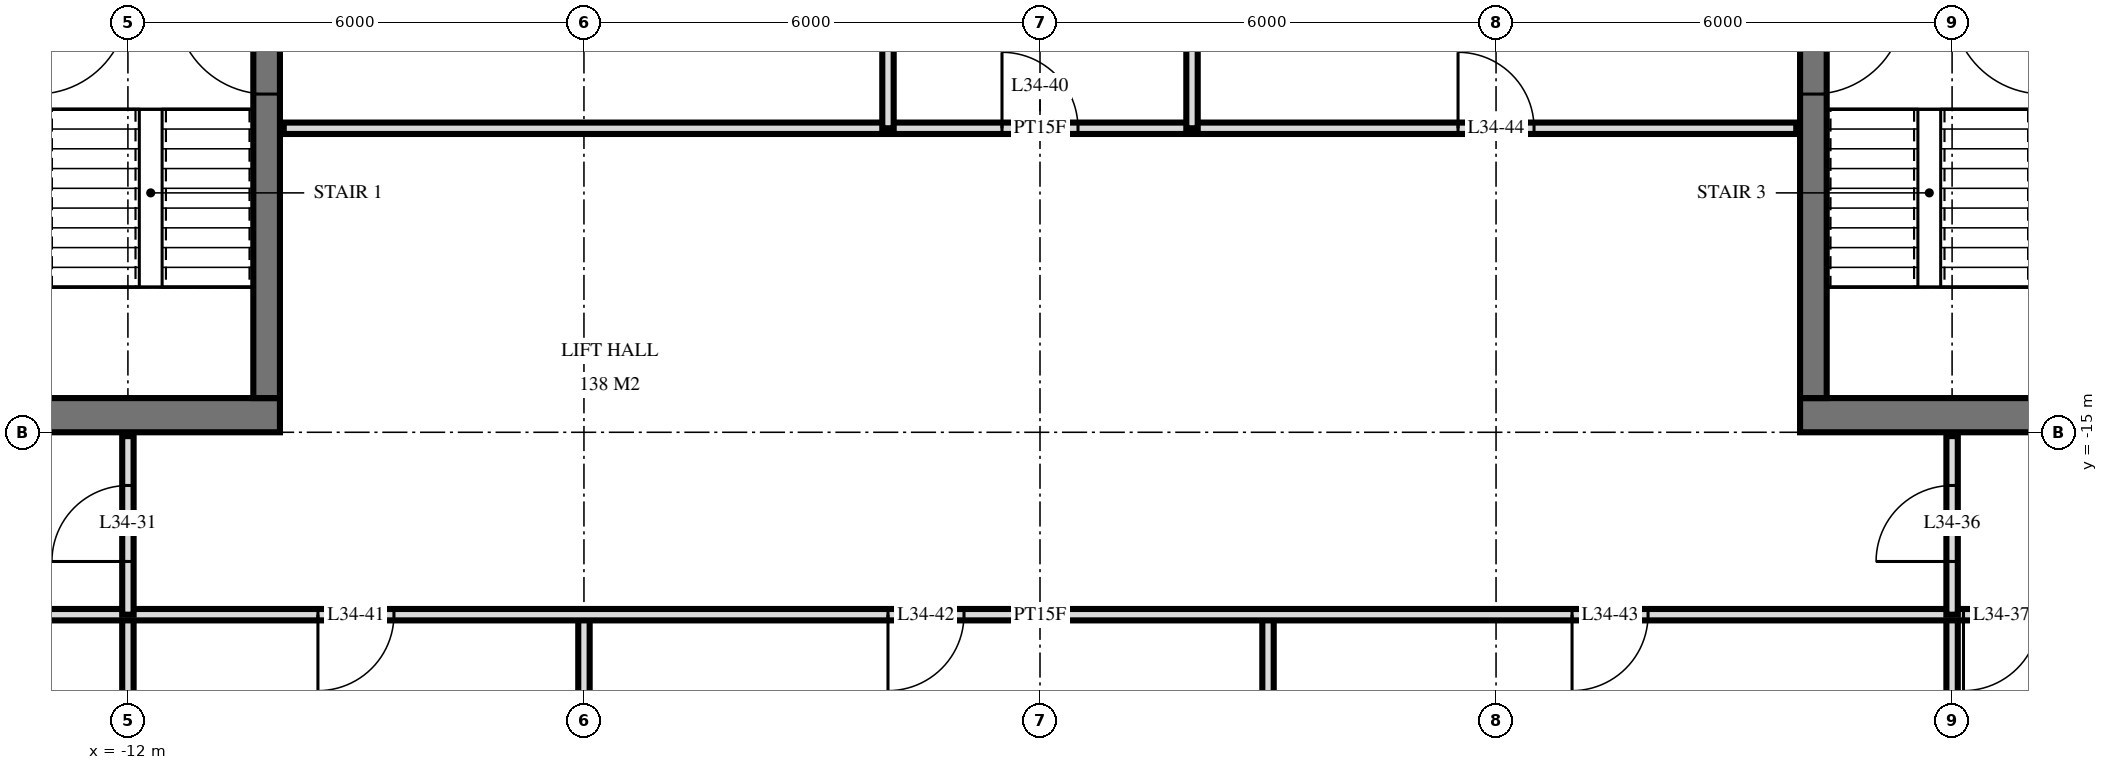
"""IFC4 building model, lengths in metres.
Left out: names, types, materials, properties, quantities, classifications, styles, units other than length and angle.
Written with IfcOpenShell. Run it as: python <this file> out.ifc"""

import sys

from ifc_helpers import new_model, si_unit, direction, frame, frame_2d, origin, place, context, subcontext, project, spatial, rectangle, extrude, element, fill, save


model = new_model("IFC4")
c1 = context("Model", 3, precision=1e-05, world=origin(), true_north=direction((0.0, 1.0)))
c2 = subcontext(c1, "Body", "Model", "MODEL_VIEW")
j1 = project(units=[si_unit("LENGTHUNIT", "METRE"), si_unit("PLANEANGLEUNIT", "RADIAN")], contexts=[c1])
p1 = place(None, origin())
s1 = spatial("IfcSite", under=j1, at=p1, CompositionType="ELEMENT")
p2 = place(p1, origin())
s2 = spatial("IfcBuilding", under=s1, at=p2, CompositionType="ELEMENT")
p3 = place(p2, frame((0.0, 0.0, 134.4)))
s3 = spatial("IfcBuildingStorey", under=s2, at=p3, CompositionType="ELEMENT", Elevation=134.4)
p4 = place(p3, frame((-24.5, -14.775, 0.0), z_axis=(0.0, 0.0, 1.0), x_axis=(1.0, 0.0, 0.0)))
e1 = element("IfcWall", 1, at=p4, inside=s3, PredefinedType="SHEAR", context=c2, shape_type="SweptSolid", body=[
    extrude(rectangle(XDim=14.5, YDim=0.45, at=frame_2d((7.25, 0.0))), origin(), (0.0, 0.0, 1.0), 3.6),
])
p5 = place(p4, frame((6.2, 0.0, 0.0)))
e2 = element("IfcOpeningElement", 2, at=p5, cuts=e1, PredefinedType="OPENING", context=c2, shape_type="SweptSolid", body=[
    extrude(rectangle(XDim=1.2, YDim=2.1, at=frame_2d((0.6, 1.05))), frame((0.0, 0.235, 0.0), z_axis=(0.0, -1.0, 0.0), x_axis=(1.0, 0.0, 0.0)), (0.0, 0.0, 1.0), 0.47),
])
p6 = place(p4, frame((9.25, 0.0, 0.0)))
e3 = element("IfcOpeningElement", 3, at=p6, cuts=e1, PredefinedType="OPENING", context=c2, shape_type="SweptSolid", body=[
    extrude(rectangle(XDim=1.1, YDim=2.1, at=frame_2d((0.55, 1.05))), frame((0.0, 0.235, 0.0), z_axis=(0.0, -1.0, 0.0), x_axis=(1.0, 0.0, 0.0)), (0.0, 0.0, 1.0), 0.47),
])
p7 = place(p4, frame((3.5, 0.0, 0.0)))
e4 = element("IfcOpeningElement", 4, at=p7, cuts=e1, PredefinedType="OPENING", context=c2, shape_type="SweptSolid", body=[
    extrude(rectangle(XDim=0.9, YDim=2.1, at=frame_2d((0.45, 1.05))), frame((0.0, 0.235, 0.0), z_axis=(0.0, -1.0, 0.0), x_axis=(1.0, 0.0, 0.0)), (0.0, 0.0, 1.0), 0.47),
])
p8 = place(p4, frame((1.05, 0.0, 0.0)))
e5 = element("IfcOpeningElement", 5, at=p8, cuts=e1, PredefinedType="OPENING", context=c2, shape_type="SweptSolid", body=[
    extrude(rectangle(XDim=1.0, YDim=2.1, at=frame_2d((0.5, 1.05))), frame((0.0, 0.235, 0.0), z_axis=(0.0, -1.0, 0.0), x_axis=(1.0, 0.0, 0.0)), (0.0, 0.0, 1.0), 0.47),
])
p9 = place(p3, frame((-10.175, -14.55, 0.0), z_axis=(0.0, 0.0, 1.0), x_axis=(0.0, 1.0, 0.0)))
e6 = element("IfcWall", 6, at=p9, inside=s3, PredefinedType="SHEAR", context=c2, shape_type="SweptSolid", body=[
    extrude(rectangle(XDim=14.1, YDim=0.35, at=frame_2d((7.05, 0.0))), origin(), (0.0, 0.0, 1.0), 3.6),
])
p10 = place(p9, frame((8.4, 0.0, 0.0)))
e7 = element("IfcOpeningElement", 7, at=p10, cuts=e6, PredefinedType="OPENING", context=c2, shape_type="SweptSolid", body=[
    extrude(rectangle(XDim=1.4, YDim=2.4, at=frame_2d((0.7, 1.2))), frame((0.0, 0.185, 0.0), z_axis=(0.0, -1.0, 0.0), x_axis=(1.0, 0.0, 0.0)), (0.0, 0.0, 1.0), 0.37),
])
p11 = place(p9, frame((10.0, 0.0, 0.0)))
e8 = element("IfcOpeningElement", 8, at=p11, cuts=e6, PredefinedType="OPENING", context=c2, shape_type="SweptSolid", body=[
    extrude(rectangle(XDim=1.4, YDim=2.4, at=frame_2d((0.7, 1.2))), frame((0.0, 0.185, 0.0), z_axis=(0.0, -1.0, 0.0), x_axis=(1.0, 0.0, 0.0)), (0.0, 0.0, 1.0), 0.37),
])
p12 = place(p9, frame((4.0, 0.0, 0.0)))
e9 = element("IfcOpeningElement", 9, at=p12, cuts=e6, PredefinedType="OPENING", context=c2, shape_type="SweptSolid", body=[
    extrude(rectangle(XDim=1.2, YDim=2.1, at=frame_2d((0.6, 1.05))), frame((0.0, 0.185, 0.0), z_axis=(0.0, -1.0, 0.0), x_axis=(1.0, 0.0, 0.0)), (0.0, 0.0, 1.0), 0.37),
])
p13 = place(p3, frame((10.0, -14.775, 0.0), z_axis=(0.0, 0.0, 1.0), x_axis=(1.0, 0.0, 0.0)))
e10 = element("IfcWall", 10, at=p13, inside=s3, PredefinedType="SHEAR", context=c2, shape_type="SweptSolid", body=[
    extrude(rectangle(XDim=14.5, YDim=0.45, at=frame_2d((7.25, 0.0))), origin(), (0.0, 0.0, 1.0), 3.6),
])
p14 = place(p13, frame((7.1, 0.0, 0.0)))
e11 = element("IfcOpeningElement", 11, at=p14, cuts=e10, PredefinedType="OPENING", context=c2, shape_type="SweptSolid", body=[
    extrude(rectangle(XDim=1.2, YDim=2.1, at=frame_2d((0.6, 1.05))), frame((0.0, 0.235, 0.0), z_axis=(0.0, -1.0, 0.0), x_axis=(1.0, 0.0, 0.0)), (0.0, 0.0, 1.0), 0.47),
])
p15 = place(p13, frame((4.15, 0.0, 0.0)))
e12 = element("IfcOpeningElement", 12, at=p15, cuts=e10, PredefinedType="OPENING", context=c2, shape_type="SweptSolid", body=[
    extrude(rectangle(XDim=1.1, YDim=2.1, at=frame_2d((0.55, 1.05))), frame((0.0, 0.235, 0.0), z_axis=(0.0, -1.0, 0.0), x_axis=(1.0, 0.0, 0.0)), (0.0, 0.0, 1.0), 0.47),
])
p16 = place(p13, frame((10.1, 0.0, 0.0)))
e13 = element("IfcOpeningElement", 13, at=p16, cuts=e10, PredefinedType="OPENING", context=c2, shape_type="SweptSolid", body=[
    extrude(rectangle(XDim=0.9, YDim=2.1, at=frame_2d((0.45, 1.05))), frame((0.0, 0.235, 0.0), z_axis=(0.0, -1.0, 0.0), x_axis=(1.0, 0.0, 0.0)), (0.0, 0.0, 1.0), 0.47),
])
p17 = place(p13, frame((12.45, 0.0, 0.0)))
e14 = element("IfcOpeningElement", 14, at=p17, cuts=e10, PredefinedType="OPENING", context=c2, shape_type="SweptSolid", body=[
    extrude(rectangle(XDim=1.0, YDim=2.1, at=frame_2d((0.5, 1.05))), frame((0.0, 0.235, 0.0), z_axis=(0.0, -1.0, 0.0), x_axis=(1.0, 0.0, 0.0)), (0.0, 0.0, 1.0), 0.47),
])
p18 = place(p3, frame((10.175, -14.55, 0.0), z_axis=(0.0, 0.0, 1.0), x_axis=(0.0, 1.0, 0.0)))
e15 = element("IfcWall", 15, at=p18, inside=s3, PredefinedType="SHEAR", context=c2, shape_type="SweptSolid", body=[
    extrude(rectangle(XDim=14.1, YDim=0.35, at=frame_2d((7.05, 0.0))), origin(), (0.0, 0.0, 1.0), 3.6),
])
p19 = place(p18, frame((8.4, 0.0, 0.0)))
e16 = element("IfcOpeningElement", 16, at=p19, cuts=e15, PredefinedType="OPENING", context=c2, shape_type="SweptSolid", body=[
    extrude(rectangle(XDim=1.4, YDim=2.4, at=frame_2d((0.7, 1.2))), frame((0.0, 0.185, 0.0), z_axis=(0.0, -1.0, 0.0), x_axis=(1.0, 0.0, 0.0)), (0.0, 0.0, 1.0), 0.37),
])
p20 = place(p18, frame((10.0, 0.0, 0.0)))
e17 = element("IfcOpeningElement", 17, at=p20, cuts=e15, PredefinedType="OPENING", context=c2, shape_type="SweptSolid", body=[
    extrude(rectangle(XDim=1.4, YDim=2.4, at=frame_2d((0.7, 1.2))), frame((0.0, 0.185, 0.0), z_axis=(0.0, -1.0, 0.0), x_axis=(1.0, 0.0, 0.0)), (0.0, 0.0, 1.0), 0.37),
])
p21 = place(p18, frame((4.0, 0.0, 0.0)))
e18 = element("IfcOpeningElement", 18, at=p21, cuts=e15, PredefinedType="OPENING", context=c2, shape_type="SweptSolid", body=[
    extrude(rectangle(XDim=1.2, YDim=2.1, at=frame_2d((0.6, 1.05))), frame((0.0, 0.185, 0.0), z_axis=(0.0, -1.0, 0.0), x_axis=(1.0, 0.0, 0.0)), (0.0, 0.0, 1.0), 0.37),
])
p22 = place(p3, frame((12.0, -17.4, 0.0), z_axis=(0.0, 0.0, 1.0), x_axis=(0.0, 1.0, 0.0)))
e19 = element("IfcWall", 19, at=p22, inside=s3, PredefinedType="PARTITIONING", context=c2, shape_type="SweptSolid", body=[
    extrude(rectangle(XDim=2.35, YDim=0.15, at=frame_2d((1.175, 0.0))), origin(), (0.0, 0.0, 1.0), 3.32),
])
p23 = place(p22, frame((0.7, 0.0, 0.0)))
e20 = element("IfcOpeningElement", 20, at=p23, cuts=e19, PredefinedType="OPENING", context=c2, shape_type="SweptSolid", body=[
    extrude(rectangle(XDim=1.0, YDim=2.1, at=frame_2d((0.5, 1.05))), frame((0.0, 0.085, 0.0), z_axis=(0.0, -1.0, 0.0), x_axis=(1.0, 0.0, 0.0)), (0.0, 0.0, 1.0), 0.17),
])
for number, where, z_axis, x_axis in (
    (21, (12.0, -33.62, 0.0), (0.0, 0.0, 1.0), (0.0, 1.0, 0.0)),
    (22, (3.0, -33.62, 0.0), (0.0, 0.0, 1.0), (0.0, 1.0, 0.0)),
):
    element("IfcWall", number, at=place(p3, frame(where, z_axis=z_axis, x_axis=x_axis)), inside=s3, PredefinedType="PARTITIONING", context=c2, shape_type="SweptSolid", body=[
        extrude(rectangle(XDim=16.22, YDim=0.15, at=frame_2d((8.11, 0.0))), origin(), (0.0, 0.0, 1.0), 3.32),
    ])
for number, where, z_axis, x_axis in (
    (23, (2.0, -11.0, 0.0), (0.0, 0.0, 1.0), (0.0, 1.0, 0.0)),
    (24, (-2.0, -11.0, 0.0), (0.0, 0.0, 1.0), (0.0, 1.0, 0.0)),
):
    element("IfcWall", number, at=place(p3, frame(where, z_axis=z_axis, x_axis=x_axis)), inside=s3, PredefinedType="PARTITIONING", context=c2, shape_type="SweptSolid", body=[
        extrude(rectangle(XDim=4.0, YDim=0.15, at=frame_2d((2.0, 0.0))), origin(), (0.0, 0.0, 1.0), 3.32),
    ])
p24 = place(p3, frame((-6.0, -33.62, 0.0), z_axis=(0.0, 0.0, 1.0), x_axis=(0.0, 1.0, 0.0)))
e25 = element("IfcWall", 25, at=p24, inside=s3, PredefinedType="PARTITIONING", context=c2, shape_type="SweptSolid", body=[
    extrude(rectangle(XDim=16.22, YDim=0.15, at=frame_2d((8.11, 0.0))), origin(), (0.0, 0.0, 1.0), 3.32),
])
p25 = place(p3, frame((-12.0, -17.4, 0.0), z_axis=(0.0, 0.0, 1.0), x_axis=(0.0, 1.0, 0.0)))
e26 = element("IfcWall", 26, at=p25, inside=s3, PredefinedType="PARTITIONING", context=c2, shape_type="SweptSolid", body=[
    extrude(rectangle(XDim=2.35, YDim=0.15, at=frame_2d((1.175, 0.0))), origin(), (0.0, 0.0, 1.0), 3.32),
])
p26 = place(p25, frame((0.7, 0.0, 0.0)))
e27 = element("IfcOpeningElement", 27, at=p26, cuts=e26, PredefinedType="OPENING", context=c2, shape_type="SweptSolid", body=[
    extrude(rectangle(XDim=1.0, YDim=2.1, at=frame_2d((0.5, 1.05))), frame((0.0, 0.085, 0.0), z_axis=(0.0, -1.0, 0.0), x_axis=(1.0, 0.0, 0.0)), (0.0, 0.0, 1.0), 0.17),
])
p27 = place(p3, frame((-12.0, -33.62, 0.0), z_axis=(0.0, 0.0, 1.0), x_axis=(0.0, 1.0, 0.0)))
e28 = element("IfcWall", 28, at=p27, inside=s3, PredefinedType="PARTITIONING", context=c2, shape_type="SweptSolid", body=[
    extrude(rectangle(XDim=16.22, YDim=0.15, at=frame_2d((8.11, 0.0))), origin(), (0.0, 0.0, 1.0), 3.32),
])
p28 = place(p3, frame((-28.02, -17.4, 0.0), z_axis=(0.0, 0.0, 1.0), x_axis=(1.0, 0.0, 0.0)))
e29 = element("IfcWall", 29, at=p28, inside=s3, PredefinedType="PARTITIONING", context=c2, shape_type="SweptSolid", body=[
    extrude(rectangle(XDim=56.04, YDim=0.15, at=frame_2d((28.02, 0.0))), origin(), (0.0, 0.0, 1.0), 3.32),
])
p29 = place(p28, frame((13.17, 0.0, 0.0)))
e30 = element("IfcOpeningElement", 30, at=p29, cuts=e29, PredefinedType="OPENING", context=c2, shape_type="SweptSolid", body=[
    extrude(rectangle(XDim=1.0, YDim=2.1, at=frame_2d((0.5, 1.05))), frame((0.0, 0.085, 0.0), z_axis=(0.0, -1.0, 0.0), x_axis=(1.0, 0.0, 0.0)), (0.0, 0.0, 1.0), 0.17),
])
p30 = place(p28, frame((11.87, 0.0, 0.0)))
e31 = element("IfcOpeningElement", 31, at=p30, cuts=e29, PredefinedType="OPENING", context=c2, shape_type="SweptSolid", body=[
    extrude(rectangle(XDim=1.0, YDim=2.1, at=frame_2d((0.5, 1.05))), frame((0.0, 0.085, 0.0), z_axis=(0.0, -1.0, 0.0), x_axis=(1.0, 0.0, 0.0)), (0.0, 0.0, 1.0), 0.17),
])
p31 = place(p28, frame((2.32, 0.0, 0.0)))
e32 = element("IfcOpeningElement", 32, at=p31, cuts=e29, PredefinedType="OPENING", context=c2, shape_type="SweptSolid", body=[
    extrude(rectangle(XDim=1.0, YDim=2.1, at=frame_2d((0.5, 1.05))), frame((0.0, 0.085, 0.0), z_axis=(0.0, -1.0, 0.0), x_axis=(1.0, 0.0, 0.0)), (0.0, 0.0, 1.0), 0.17),
])
p32 = place(p28, frame((40.17, 0.0, 0.0)))
e33 = element("IfcOpeningElement", 33, at=p32, cuts=e29, PredefinedType="OPENING", context=c2, shape_type="SweptSolid", body=[
    extrude(rectangle(XDim=1.0, YDim=2.1, at=frame_2d((0.5, 1.05))), frame((0.0, 0.085, 0.0), z_axis=(0.0, -1.0, 0.0), x_axis=(1.0, 0.0, 0.0)), (0.0, 0.0, 1.0), 0.17),
])
p33 = place(p28, frame((51.22, 0.0, 0.0)))
e34 = element("IfcOpeningElement", 34, at=p33, cuts=e29, PredefinedType="OPENING", context=c2, shape_type="SweptSolid", body=[
    extrude(rectangle(XDim=1.0, YDim=2.1, at=frame_2d((0.5, 1.05))), frame((0.0, 0.085, 0.0), z_axis=(0.0, -1.0, 0.0), x_axis=(1.0, 0.0, 0.0)), (0.0, 0.0, 1.0), 0.17),
])
p34 = place(p28, frame((18.52, 0.0, 0.0)))
e35 = element("IfcOpeningElement", 35, at=p34, cuts=e29, PredefinedType="OPENING", context=c2, shape_type="SweptSolid", body=[
    extrude(rectangle(XDim=1.0, YDim=2.1, at=frame_2d((0.5, 1.05))), frame((0.0, 0.085, 0.0), z_axis=(0.0, -1.0, 0.0), x_axis=(1.0, 0.0, 0.0)), (0.0, 0.0, 1.0), 0.17),
])
p35 = place(p28, frame((26.02, 0.0, 0.0)))
e36 = element("IfcOpeningElement", 36, at=p35, cuts=e29, PredefinedType="OPENING", context=c2, shape_type="SweptSolid", body=[
    extrude(rectangle(XDim=1.0, YDim=2.1, at=frame_2d((0.5, 1.05))), frame((0.0, 0.085, 0.0), z_axis=(0.0, -1.0, 0.0), x_axis=(1.0, 0.0, 0.0)), (0.0, 0.0, 1.0), 0.17),
])
p36 = place(p28, frame((35.02, 0.0, 0.0)))
e37 = element("IfcOpeningElement", 37, at=p36, cuts=e29, PredefinedType="OPENING", context=c2, shape_type="SweptSolid", body=[
    extrude(rectangle(XDim=1.0, YDim=2.1, at=frame_2d((0.5, 1.05))), frame((0.0, 0.085, 0.0), z_axis=(0.0, -1.0, 0.0), x_axis=(1.0, 0.0, 0.0)), (0.0, 0.0, 1.0), 0.17),
])
p37 = place(p3, frame((-9.95, -11.0, 0.0), z_axis=(0.0, 0.0, 1.0), x_axis=(1.0, 0.0, 0.0)))
e38 = element("IfcWall", 38, at=p37, inside=s3, PredefinedType="PARTITIONING", context=c2, shape_type="SweptSolid", body=[
    extrude(rectangle(XDim=19.9, YDim=0.15, at=frame_2d((9.95, 0.0))), origin(), (0.0, 0.0, 1.0), 3.32),
])
p38 = place(p37, frame((9.45, 0.0, 0.0)))
e39 = element("IfcOpeningElement", 39, at=p38, cuts=e38, PredefinedType="OPENING", context=c2, shape_type="SweptSolid", body=[
    extrude(rectangle(XDim=1.0, YDim=2.1, at=frame_2d((0.5, 1.05))), frame((0.0, 0.085, 0.0), z_axis=(0.0, -1.0, 0.0), x_axis=(1.0, 0.0, 0.0)), (0.0, 0.0, 1.0), 0.17),
])
p39 = place(p37, frame((15.45, 0.0, 0.0)))
e40 = element("IfcOpeningElement", 40, at=p39, cuts=e38, PredefinedType="OPENING", context=c2, shape_type="SweptSolid", body=[
    extrude(rectangle(XDim=1.0, YDim=2.1, at=frame_2d((0.5, 1.05))), frame((0.0, 0.085, 0.0), z_axis=(0.0, -1.0, 0.0), x_axis=(1.0, 0.0, 0.0)), (0.0, 0.0, 1.0), 0.17),
])
p40 = place(p12, origin())
e41 = element("IfcDoor", 41, at=p40, inside=s3, OperationType="SINGLE_SWING_LEFT", PredefinedType="DOOR", context=c2, shape_type="SweptSolid", body=[
    extrude(rectangle(XDim=1.2, YDim=2.1, at=frame_2d((0.6, 1.05))), frame((0.0, 0.025, 0.0), z_axis=(0.0, -1.0, 0.0), x_axis=(1.0, 0.0, 0.0)), (0.0, 0.0, 1.0), 0.05),
])
fill(e9, e41)
p41 = place(p21, frame((0.6, 0.0, 0.0), z_axis=(0.0, 0.0, 1.0), x_axis=(-1.0, 0.0, 0.0)))
e42 = element("IfcDoor", 42, at=p41, inside=s3, OperationType="SINGLE_SWING_RIGHT", PredefinedType="DOOR", context=c2, shape_type="SweptSolid", body=[
    extrude(rectangle(XDim=1.2, YDim=2.1, at=frame_2d((0.0, 1.05))), frame((0.0, -0.025, 0.0), z_axis=(0.0, 1.0, 0.0), x_axis=(-1.0, 0.0, 0.0)), (0.0, 0.0, 1.0), 0.05),
])
fill(e18, e42)
p42 = place(p26, origin())
e43 = element("IfcDoor", 43, at=p42, inside=s3, OperationType="SINGLE_SWING_RIGHT", PredefinedType="DOOR", context=c2, shape_type="SweptSolid", body=[
    extrude(rectangle(XDim=1.0, YDim=2.1, at=frame_2d((0.5, 1.05))), frame((0.0, 0.025, 0.0), z_axis=(0.0, -1.0, 0.0), x_axis=(1.0, 0.0, 0.0)), (0.0, 0.0, 1.0), 0.05),
])
fill(e27, e43)
p43 = place(p23, origin())
e44 = element("IfcDoor", 44, at=p43, inside=s3, OperationType="SINGLE_SWING_RIGHT", PredefinedType="DOOR", context=c2, shape_type="SweptSolid", body=[
    extrude(rectangle(XDim=1.0, YDim=2.1, at=frame_2d((0.5, 1.05))), frame((0.0, 0.025, 0.0), z_axis=(0.0, -1.0, 0.0), x_axis=(1.0, 0.0, 0.0)), (0.0, 0.0, 1.0), 0.05),
])
fill(e20, e44)
p44 = place(p32, frame((0.5, 0.0, 0.0), z_axis=(0.0, 0.0, 1.0), x_axis=(-1.0, 0.0, 0.0)))
e45 = element("IfcDoor", 45, at=p44, inside=s3, OperationType="SINGLE_SWING_LEFT", PredefinedType="DOOR", context=c2, shape_type="SweptSolid", body=[
    extrude(rectangle(XDim=1.0, YDim=2.1, at=frame_2d((0.0, 1.05))), frame((0.0, -0.025, 0.0), z_axis=(0.0, 1.0, 0.0), x_axis=(-1.0, 0.0, 0.0)), (0.0, 0.0, 1.0), 0.05),
])
fill(e33, e45)
p45 = place(p38, origin())
e46 = element("IfcDoor", 46, at=p45, inside=s3, OperationType="SINGLE_SWING_RIGHT", PredefinedType="DOOR", context=c2, shape_type="SweptSolid", body=[
    extrude(rectangle(XDim=1.0, YDim=2.1, at=frame_2d((0.5, 1.05))), frame((0.0, 0.025, 0.0), z_axis=(0.0, -1.0, 0.0), x_axis=(1.0, 0.0, 0.0)), (0.0, 0.0, 1.0), 0.05),
])
fill(e39, e46)
p46 = place(p34, frame((0.5, 0.0, 0.0), z_axis=(0.0, 0.0, 1.0), x_axis=(-1.0, 0.0, 0.0)))
e47 = element("IfcDoor", 47, at=p46, inside=s3, OperationType="SINGLE_SWING_LEFT", PredefinedType="DOOR", context=c2, shape_type="SweptSolid", body=[
    extrude(rectangle(XDim=1.0, YDim=2.1, at=frame_2d((0.0, 1.05))), frame((0.0, -0.025, 0.0), z_axis=(0.0, 1.0, 0.0), x_axis=(-1.0, 0.0, 0.0)), (0.0, 0.0, 1.0), 0.05),
])
fill(e35, e47)
p47 = place(p35, frame((0.5, 0.0, 0.0), z_axis=(0.0, 0.0, 1.0), x_axis=(-1.0, 0.0, 0.0)))
e48 = element("IfcDoor", 48, at=p47, inside=s3, OperationType="SINGLE_SWING_LEFT", PredefinedType="DOOR", context=c2, shape_type="SweptSolid", body=[
    extrude(rectangle(XDim=1.0, YDim=2.1, at=frame_2d((0.0, 1.05))), frame((0.0, -0.025, 0.0), z_axis=(0.0, 1.0, 0.0), x_axis=(-1.0, 0.0, 0.0)), (0.0, 0.0, 1.0), 0.05),
])
fill(e36, e48)
p48 = place(p36, frame((0.5, 0.0, 0.0), z_axis=(0.0, 0.0, 1.0), x_axis=(-1.0, 0.0, 0.0)))
e49 = element("IfcDoor", 49, at=p48, inside=s3, OperationType="SINGLE_SWING_LEFT", PredefinedType="DOOR", context=c2, shape_type="SweptSolid", body=[
    extrude(rectangle(XDim=1.0, YDim=2.1, at=frame_2d((0.0, 1.05))), frame((0.0, -0.025, 0.0), z_axis=(0.0, 1.0, 0.0), x_axis=(-1.0, 0.0, 0.0)), (0.0, 0.0, 1.0), 0.05),
])
fill(e37, e49)
p49 = place(p39, origin())
e50 = element("IfcDoor", 50, at=p49, inside=s3, OperationType="SINGLE_SWING_RIGHT", PredefinedType="DOOR", context=c2, shape_type="SweptSolid", body=[
    extrude(rectangle(XDim=1.0, YDim=2.1, at=frame_2d((0.5, 1.05))), frame((0.0, 0.025, 0.0), z_axis=(0.0, -1.0, 0.0), x_axis=(1.0, 0.0, 0.0)), (0.0, 0.0, 1.0), 0.05),
])
fill(e40, e50)
save(model, sys.argv[1])
